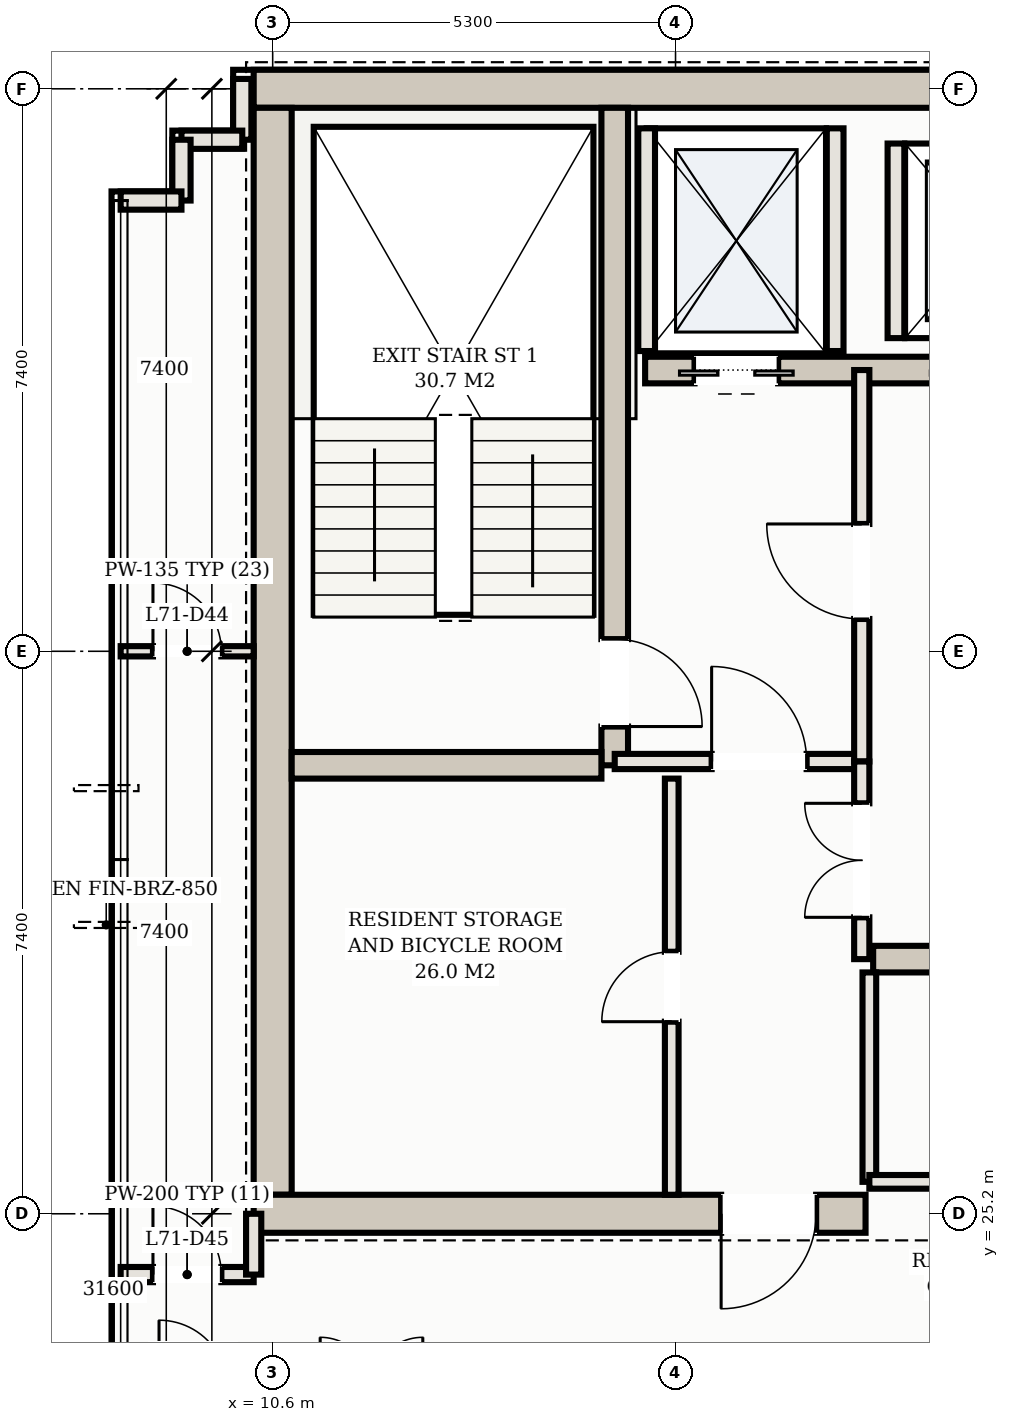
"""IFC4 building model, lengths in metres.
Left out: names, types, materials, properties, quantities, classifications, styles, units other than length and angle.
Written with IfcOpenShell. Run it as: python <this file> out.ifc"""

import sys

from ifc_helpers import new_model, si_unit, direction, frame, frame_2d, origin, place, context, subcontext, project, spatial, rectangle, extrude, element, fill, save


model = new_model("IFC4")
c1 = context("Model", 3, precision=1e-05, world=origin(), true_north=direction((0.0, 1.0)))
c2 = subcontext(c1, "Body", "Model", "MODEL_VIEW")
j1 = project(units=[si_unit("LENGTHUNIT", "METRE"), si_unit("PLANEANGLEUNIT", "RADIAN")], contexts=[c1])
p1 = place(None, origin())
s1 = spatial("IfcSite", under=j1, at=p1, CompositionType="ELEMENT")
p2 = place(p1, origin())
s2 = spatial("IfcBuilding", under=s1, at=p2, CompositionType="ELEMENT")
p3 = place(p2, frame((0.0, 0.0, 256.1)))
s3 = spatial("IfcBuildingStorey", under=s2, at=p3, CompositionType="ELEMENT", Elevation=256.1)
p4 = place(p3, frame((10.35, 40.0, 0.0), z_axis=(0.0, 0.0, 1.0), x_axis=(1.0, 0.0, 0.0)))
e1 = element("IfcWall", 1, at=p4, inside=s3, PredefinedType="SHEAR", context=c2, shape_type="SweptSolid", body=[
    extrude(rectangle(XDim=32.3, YDim=0.5, at=frame_2d((16.15, 0.0))), origin(), (0.0, 0.0, 1.0), 3.11),
])
p5 = place(p3, frame((10.6, 25.45, 0.0), z_axis=(0.0, 0.0, 1.0), x_axis=(0.0, 1.0, 0.0)))
e2 = element("IfcWall", 2, at=p5, inside=s3, PredefinedType="SHEAR", context=c2, shape_type="SweptSolid", body=[
    extrude(rectangle(XDim=14.3, YDim=0.5, at=frame_2d((7.15, 0.0))), origin(), (0.0, 0.0, 1.0), 3.11),
])
p6 = place(p3, frame((10.35, 25.2, 0.0), z_axis=(0.0, 0.0, 1.0), x_axis=(1.0, 0.0, 0.0)))
e3 = element("IfcWall", 3, at=p6, inside=s3, PredefinedType="SHEAR", context=c2, shape_type="SweptSolid", body=[
    extrude(rectangle(XDim=8.05, YDim=0.5, at=frame_2d((4.025, 0.0))), origin(), (0.0, 0.0, 1.0), 3.11),
])
p7 = place(p6, frame((6.15, 0.0, 0.0)))
e4 = element("IfcOpeningElement", 4, at=p7, cuts=e3, PredefinedType="OPENING", context=c2, shape_type="SweptSolid", body=[
    extrude(rectangle(XDim=1.25, YDim=2.2, at=frame_2d((0.625, 1.1))), frame((0.0, 0.26, 0.0), z_axis=(0.0, -1.0, 0.0), x_axis=(1.0, 0.0, 0.0)), (0.0, 0.0, 1.0), 0.52),
])
p8 = place(p3, frame((15.1, 31.1, 0.0), z_axis=(0.0, 0.0, 1.0), x_axis=(0.0, 1.0, 0.0)))
e5 = element("IfcWall", 5, at=p8, inside=s3, PredefinedType="SHEAR", context=c2, shape_type="SweptSolid", body=[
    extrude(rectangle(XDim=8.65, YDim=0.35, at=frame_2d((4.325, 0.0))), origin(), (0.0, 0.0, 1.0), 3.11),
])
p9 = place(p8, frame((0.51, 0.0, 0.0)))
e6 = element("IfcOpeningElement", 6, at=p9, cuts=e5, PredefinedType="OPENING", context=c2, shape_type="SweptSolid", body=[
    extrude(rectangle(XDim=1.15, YDim=2.2, at=frame_2d((0.575, 1.1))), frame((0.0, 0.185, 0.0), z_axis=(0.0, -1.0, 0.0), x_axis=(1.0, 0.0, 0.0)), (0.0, 0.0, 1.0), 0.37),
])
p10 = place(p3, frame((10.85, 31.1, 0.0), z_axis=(0.0, 0.0, 1.0), x_axis=(1.0, 0.0, 0.0)))
e7 = element("IfcWall", 7, at=p10, inside=s3, PredefinedType="SHEAR", context=c2, shape_type="SweptSolid", body=[
    extrude(rectangle(XDim=4.075, YDim=0.35, at=frame_2d((2.038, 0.0))), origin(), (0.0, 0.0, 1.0), 3.11),
])
p11 = place(p3, frame((15.5, 36.3, 0.0), z_axis=(0.0, 0.0, 1.0), x_axis=(1.0, 0.0, 0.0)))
e8 = element("IfcWall", 8, at=p11, inside=s3, PredefinedType="SHEAR", context=c2, shape_type="SweptSolid", body=[
    extrude(rectangle(XDim=22.0, YDim=0.35, at=frame_2d((11.0, 0.0))), origin(), (0.0, 0.0, 1.0), 3.11),
])
p12 = place(p11, frame((0.65, 0.0, 0.0)))
e9 = element("IfcOpeningElement", 9, at=p12, cuts=e8, PredefinedType="OPENING", context=c2, shape_type="SweptSolid", body=[
    extrude(rectangle(XDim=1.1, YDim=2.15, at=frame_2d((0.55, 1.075))), frame((0.0, 0.185, 0.0), z_axis=(0.0, -1.0, 0.0), x_axis=(1.0, 0.0, 0.0)), (0.0, 0.0, 1.0), 0.37),
])
p13 = place(p11, frame((20.25, 0.0, 0.0)))
e10 = element("IfcOpeningElement", 10, at=p13, cuts=e8, PredefinedType="OPENING", context=c2, shape_type="SweptSolid", body=[
    extrude(rectangle(XDim=1.1, YDim=2.15, at=frame_2d((0.55, 1.075))), frame((0.0, 0.185, 0.0), z_axis=(0.0, -1.0, 0.0), x_axis=(1.0, 0.0, 0.0)), (0.0, 0.0, 1.0), 0.37),
])
p14 = place(p11, frame((17.05, 0.0, 0.0)))
e11 = element("IfcOpeningElement", 11, at=p14, cuts=e8, PredefinedType="OPENING", context=c2, shape_type="SweptSolid", body=[
    extrude(rectangle(XDim=1.3, YDim=2.2, at=frame_2d((0.65, 1.1))), frame((0.0, 0.185, 0.0), z_axis=(0.0, -1.0, 0.0), x_axis=(1.0, 0.0, 0.0)), (0.0, 0.0, 1.0), 0.37),
])
p15 = place(p11, frame((3.95, 0.0, 0.0)))
e12 = element("IfcOpeningElement", 12, at=p15, cuts=e8, PredefinedType="OPENING", context=c2, shape_type="SweptSolid", body=[
    extrude(rectangle(XDim=1.1, YDim=2.15, at=frame_2d((0.55, 1.075))), frame((0.0, 0.185, 0.0), z_axis=(0.0, -1.0, 0.0), x_axis=(1.0, 0.0, 0.0)), (0.0, 0.0, 1.0), 0.37),
])
p16 = place(p11, frame((6.55, 0.0, 0.0)))
e13 = element("IfcOpeningElement", 13, at=p16, cuts=e8, PredefinedType="OPENING", context=c2, shape_type="SweptSolid", body=[
    extrude(rectangle(XDim=1.1, YDim=2.15, at=frame_2d((0.55, 1.075))), frame((0.0, 0.185, 0.0), z_axis=(0.0, -1.0, 0.0), x_axis=(1.0, 0.0, 0.0)), (0.0, 0.0, 1.0), 0.37),
])
p17 = place(p11, frame((9.15, 0.0, 0.0)))
e14 = element("IfcOpeningElement", 14, at=p17, cuts=e8, PredefinedType="OPENING", context=c2, shape_type="SweptSolid", body=[
    extrude(rectangle(XDim=1.1, YDim=2.15, at=frame_2d((0.55, 1.075))), frame((0.0, 0.185, 0.0), z_axis=(0.0, -1.0, 0.0), x_axis=(1.0, 0.0, 0.0)), (0.0, 0.0, 1.0), 0.37),
])
p18 = place(p3, frame((18.5, 28.55, 0.0), z_axis=(0.0, 0.0, 1.0), x_axis=(1.0, 0.0, 0.0)))
e15 = element("IfcWall", 15, at=p18, inside=s3, PredefinedType="SHEAR", context=c2, shape_type="SweptSolid", body=[
    extrude(rectangle(XDim=16.0, YDim=0.35, at=frame_2d((8.0, 0.0))), origin(), (0.0, 0.0, 1.0), 3.11),
])
for number, where, z_axis, x_axis in (
    (16, (15.52, 36.55, 0.0), (0.0, 0.0, 1.0), (0.0, 1.0, 0.0)),
    (17, (18.0, 36.55, 0.0), (0.0, 0.0, 1.0), (0.0, 1.0, 0.0)),
):
    element("IfcWall", number, at=place(p3, frame(where, z_axis=z_axis, x_axis=x_axis)), inside=s3, PredefinedType="SOLIDWALL", context=c2, shape_type="SweptSolid", body=[
        extrude(rectangle(XDim=2.93, YDim=0.22, at=frame_2d((1.465, 0.0))), origin(), (0.0, 0.0, 1.0), 3.11),
    ])
p19 = place(p3, frame((18.8, 36.72, 0.0), z_axis=(0.0, 0.0, 1.0), x_axis=(0.0, 1.0, 0.0)))
e18 = element("IfcWall", 18, at=p19, inside=s3, PredefinedType="SOLIDWALL", context=c2, shape_type="SweptSolid", body=[
    extrude(rectangle(XDim=2.56, YDim=0.22, at=frame_2d((1.28, 0.0))), origin(), (0.0, 0.0, 1.0), 3.11),
])
p20 = place(p3, frame((10.2, 40.13, 0.0), z_axis=(0.0, 0.0, 1.0), x_axis=(0.0, -1.0, 0.0)))
e19 = element("IfcWall", 19, at=p20, inside=s3, PredefinedType="SOLIDWALL", context=c2, shape_type="SweptSolid", body=[
    extrude(rectangle(XDim=0.8, YDim=0.24, at=frame_2d((0.4, 0.0))), origin(), (0.0, 0.0, 1.0), 3.11),
])
for number, where, z_axis, x_axis in (
    (20, (10.2, 39.33, 0.0), (0.0, 0.0, 1.0), (-1.0, 0.0, 0.0)),
    (21, (9.4, 39.33, 0.0), (0.0, 0.0, 1.0), (0.0, -1.0, 0.0)),
):
    element("IfcWall", number, at=place(p3, frame(where, z_axis=z_axis, x_axis=x_axis)), inside=s3, PredefinedType="SOLIDWALL", context=c2, shape_type="SweptSolid", body=[
        extrude(rectangle(XDim=0.8, YDim=0.24, at=frame_2d((0.4, 0.0))), origin(), (0.0, 0.0, 1.0), 3.11),
    ])
p21 = place(p3, frame((9.4, 38.53, 0.0), z_axis=(0.0, 0.0, 1.0), x_axis=(-1.0, 0.0, 0.0)))
e22 = element("IfcWall", 22, at=p21, inside=s3, PredefinedType="SOLIDWALL", context=c2, shape_type="SweptSolid", body=[
    extrude(rectangle(XDim=0.8, YDim=0.24, at=frame_2d((0.4, 0.0))), origin(), (0.0, 0.0, 1.0), 3.11),
])
p22 = place(p3, frame((15.1, 31.15, 0.0), z_axis=(0.0, 0.0, 1.0), x_axis=(1.0, 0.0, 0.0)))
e23 = element("IfcWall", 23, at=p22, inside=s3, PredefinedType="PARTITIONING", context=c2, shape_type="SweptSolid", body=[
    extrude(rectangle(XDim=3.25, YDim=0.2, at=frame_2d((1.625, 0.0))), origin(), (0.0, 0.0, 1.0), 2.45),
])
p23 = place(p22, frame((1.275, 0.0, 0.0)))
e24 = element("IfcOpeningElement", 24, at=p23, cuts=e23, PredefinedType="OPENING", context=c2, shape_type="SweptSolid", body=[
    extrude(rectangle(XDim=1.25, YDim=2.2, at=frame_2d((0.625, 1.1))), frame((0.0, 0.11, 0.0), z_axis=(0.0, -1.0, 0.0), x_axis=(1.0, 0.0, 0.0)), (0.0, 0.0, 1.0), 0.22),
])
p24 = place(p3, frame((18.35, 31.15, 0.0), z_axis=(0.0, 0.0, 1.0), x_axis=(0.0, 1.0, 0.0)))
e25 = element("IfcWall", 25, at=p24, inside=s3, PredefinedType="PARTITIONING", context=c2, shape_type="SweptSolid", body=[
    extrude(rectangle(XDim=5.15, YDim=0.2, at=frame_2d((2.575, 0.0))), origin(), (0.0, 0.0, 1.0), 2.45),
])
p25 = place(p24, frame((1.875, 0.0, 0.0)))
e26 = element("IfcOpeningElement", 26, at=p25, cuts=e25, PredefinedType="OPENING", context=c2, shape_type="SweptSolid", body=[
    extrude(rectangle(XDim=1.25, YDim=2.2, at=frame_2d((0.625, 1.1))), frame((0.0, 0.11, 0.0), z_axis=(0.0, -1.0, 0.0), x_axis=(1.0, 0.0, 0.0)), (0.0, 0.0, 1.0), 0.22),
])
p26 = place(p3, frame((15.85, 25.45, 0.0), z_axis=(0.0, 0.0, 1.0), x_axis=(0.0, 1.0, 0.0)))
e27 = element("IfcWall", 27, at=p26, inside=s3, PredefinedType="PARTITIONING", context=c2, shape_type="SweptSolid", body=[
    extrude(rectangle(XDim=5.475, YDim=0.18, at=frame_2d((2.738, 0.0))), origin(), (0.0, 0.0, 1.0), 2.45),
])
p27 = place(p26, frame((2.277, 0.0, 0.0)))
e28 = element("IfcOpeningElement", 28, at=p27, cuts=e27, PredefinedType="OPENING", context=c2, shape_type="SweptSolid", body=[
    extrude(rectangle(XDim=0.92, YDim=2.15, at=frame_2d((0.46, 1.075))), frame((0.0, 0.1, 0.0), z_axis=(0.0, -1.0, 0.0), x_axis=(1.0, 0.0, 0.0)), (0.0, 0.0, 1.0), 0.2),
])
p28 = place(p3, frame((18.35, 28.55, 0.0), z_axis=(0.0, 0.0, 1.0), x_axis=(0.0, 1.0, 0.0)))
e29 = element("IfcWall", 29, at=p28, inside=s3, PredefinedType="PARTITIONING", context=c2, shape_type="SweptSolid", body=[
    extrude(rectangle(XDim=2.6, YDim=0.2, at=frame_2d((1.3, 0.0))), origin(), (0.0, 0.0, 1.0), 2.45),
])
p29 = place(p28, frame((0.55, 0.0, 0.0)))
e30 = element("IfcOpeningElement", 30, at=p29, cuts=e29, PredefinedType="OPENING", context=c2, shape_type="SweptSolid", body=[
    extrude(rectangle(XDim=1.5, YDim=2.25, at=frame_2d((0.75, 1.125))), frame((0.0, 0.11, 0.0), z_axis=(0.0, -1.0, 0.0), x_axis=(1.0, 0.0, 0.0)), (0.0, 0.0, 1.0), 0.22),
])
p30 = place(p3, frame((18.45, 25.62, 0.0), z_axis=(0.0, 0.0, 1.0), x_axis=(0.0, 1.0, 0.0)))
e31 = element("IfcWall", 31, at=p30, inside=s3, PredefinedType="PARTITIONING", context=c2, shape_type="SweptSolid", body=[
    extrude(rectangle(XDim=2.755, YDim=0.18, at=frame_2d((1.377, 0.0))), origin(), (0.0, 0.0, 1.0), 2.45),
])
p31 = place(p3, frame((18.45, 25.62, 0.0), z_axis=(0.0, 0.0, 1.0), x_axis=(1.0, 0.0, 0.0)))
e32 = element("IfcWall", 32, at=p31, inside=s3, PredefinedType="PARTITIONING", context=c2, shape_type="SweptSolid", body=[
    extrude(rectangle(XDim=7.9, YDim=0.18, at=frame_2d((3.95, 0.0))), origin(), (0.0, 0.0, 1.0), 2.45),
])
p32 = place(p31, frame((3.34, 0.0, 0.0)))
e33 = element("IfcOpeningElement", 33, at=p32, cuts=e32, PredefinedType="OPENING", context=c2, shape_type="SweptSolid", body=[
    extrude(rectangle(XDim=0.92, YDim=2.15, at=frame_2d((0.46, 1.075))), frame((0.0, 0.1, 0.0), z_axis=(0.0, -1.0, 0.0), x_axis=(1.0, 0.0, 0.0)), (0.0, 0.0, 1.0), 0.2),
])
p33 = place(p3, frame((8.6, 24.4, 0.0), z_axis=(0.0, 0.0, 1.0), x_axis=(1.0, 0.0, 0.0)))
e34 = element("IfcWall", 34, at=p33, inside=s3, PredefinedType="PARTITIONING", context=c2, shape_type="SweptSolid", body=[
    extrude(rectangle(XDim=1.75, YDim=0.2, at=frame_2d((0.875, 0.0))), origin(), (0.0, 0.0, 1.0), 2.45),
])
p34 = place(p33, frame((0.425, 0.0, 0.0)))
e35 = element("IfcOpeningElement", 35, at=p34, cuts=e34, PredefinedType="OPENING", context=c2, shape_type="SweptSolid", body=[
    extrude(rectangle(XDim=0.9, YDim=2.15, at=frame_2d((0.45, 1.075))), frame((0.0, 0.11, 0.0), z_axis=(0.0, -1.0, 0.0), x_axis=(1.0, 0.0, 0.0)), (0.0, 0.0, 1.0), 0.22),
])
p35 = place(p3, frame((10.35, 24.4, 0.0), z_axis=(0.0, 0.0, 1.0), x_axis=(0.0, 1.0, 0.0)))
e36 = element("IfcWall", 36, at=p35, inside=s3, PredefinedType="PARTITIONING", context=c2, shape_type="SweptSolid", body=[
    extrude(rectangle(XDim=0.8, YDim=0.2, at=frame_2d((0.4, 0.0))), origin(), (0.0, 0.0, 1.0), 2.45),
])
p36 = place(p3, frame((8.6, 32.6, 0.0), z_axis=(0.0, 0.0, 1.0), x_axis=(1.0, 0.0, 0.0)))
e37 = element("IfcWall", 37, at=p36, inside=s3, PredefinedType="PARTITIONING", context=c2, shape_type="SweptSolid", body=[
    extrude(rectangle(XDim=1.75, YDim=0.135, at=frame_2d((0.875, 0.0))), origin(), (0.0, 0.0, 1.0), 2.45),
])
p37 = place(p36, frame((0.425, 0.0, 0.0)))
e38 = element("IfcOpeningElement", 38, at=p37, cuts=e37, PredefinedType="OPENING", context=c2, shape_type="SweptSolid", body=[
    extrude(rectangle(XDim=0.9, YDim=2.15, at=frame_2d((0.45, 1.075))), frame((0.0, 0.078, 0.0), z_axis=(0.0, -1.0, 0.0), x_axis=(1.0, 0.0, 0.0)), (0.0, 0.0, 1.0), 0.155),
])
p38 = place(p12, frame((1.1, 0.0, 0.0), z_axis=(0.0, 0.0, 1.0), x_axis=(-1.0, 0.0, 0.0)))
e39 = element("IfcDoor", 39, at=p38, inside=s3, OperationType="DOUBLE_DOOR_SLIDING", PredefinedType="DOOR", context=c2, shape_type="SweptSolid", body=[
    extrude(rectangle(XDim=1.1, YDim=2.15, at=frame_2d((0.55, 1.075))), frame((0.0, 0.025, 0.0), z_axis=(0.0, -1.0, 0.0), x_axis=(1.0, 0.0, 0.0)), (0.0, 0.0, 1.0), 0.05),
])
fill(e9, e39)
p39 = place(p7, frame((1.25, 0.0, 0.0), z_axis=(0.0, 0.0, 1.0), x_axis=(-1.0, 0.0, 0.0)))
e40 = element("IfcDoor", 40, at=p39, inside=s3, OperationType="SINGLE_SWING_RIGHT", PredefinedType="DOOR", context=c2, shape_type="SweptSolid", body=[
    extrude(rectangle(XDim=1.25, YDim=2.2, at=frame_2d((0.625, 1.1))), frame((0.0, 0.025, 0.0), z_axis=(0.0, -1.0, 0.0), x_axis=(1.0, 0.0, 0.0)), (0.0, 0.0, 1.0), 0.05),
])
fill(e4, e40)
p40 = place(p23, origin())
e41 = element("IfcDoor", 41, at=p40, inside=s3, OperationType="SINGLE_SWING_LEFT", PredefinedType="DOOR", context=c2, shape_type="SweptSolid", body=[
    extrude(rectangle(XDim=1.25, YDim=2.2, at=frame_2d((0.625, 1.1))), frame((0.0, 0.025, 0.0), z_axis=(0.0, -1.0, 0.0), x_axis=(1.0, 0.0, 0.0)), (0.0, 0.0, 1.0), 0.05),
])
fill(e24, e41)
p41 = place(p25, origin())
e42 = element("IfcDoor", 42, at=p41, inside=s3, OperationType="SINGLE_SWING_RIGHT", PredefinedType="DOOR", context=c2, shape_type="SweptSolid", body=[
    extrude(rectangle(XDim=1.25, YDim=2.2, at=frame_2d((0.625, 1.1))), frame((0.0, 0.025, 0.0), z_axis=(0.0, -1.0, 0.0), x_axis=(1.0, 0.0, 0.0)), (0.0, 0.0, 1.0), 0.05),
])
fill(e26, e42)
p42 = place(p9, frame((1.15, 0.0, 0.0), z_axis=(0.0, 0.0, 1.0), x_axis=(-1.0, 0.0, 0.0)))
e43 = element("IfcDoor", 43, at=p42, inside=s3, OperationType="SINGLE_SWING_RIGHT", PredefinedType="DOOR", context=c2, shape_type="SweptSolid", body=[
    extrude(rectangle(XDim=1.15, YDim=2.2, at=frame_2d((0.575, 1.1))), frame((0.0, 0.025, 0.0), z_axis=(0.0, -1.0, 0.0), x_axis=(1.0, 0.0, 0.0)), (0.0, 0.0, 1.0), 0.05),
])
fill(e6, e43)
p43 = place(p27, origin())
e44 = element("IfcDoor", 44, at=p43, inside=s3, OperationType="SINGLE_SWING_LEFT", PredefinedType="DOOR", context=c2, shape_type="SweptSolid", body=[
    extrude(rectangle(XDim=0.92, YDim=2.15, at=frame_2d((0.46, 1.075))), frame((0.0, 0.025, 0.0), z_axis=(0.0, -1.0, 0.0), x_axis=(1.0, 0.0, 0.0)), (0.0, 0.0, 1.0), 0.05),
])
fill(e28, e44)
p44 = place(p29, origin())
e45 = element("IfcDoor", 45, at=p44, inside=s3, OperationType="DOUBLE_DOOR_SINGLE_SWING", PredefinedType="DOOR", context=c2, shape_type="SweptSolid", body=[
    extrude(rectangle(XDim=1.5, YDim=2.25, at=frame_2d((0.75, 1.125))), frame((0.0, 0.025, 0.0), z_axis=(0.0, -1.0, 0.0), x_axis=(1.0, 0.0, 0.0)), (0.0, 0.0, 1.0), 0.05),
])
fill(e30, e45)
p45 = place(p37, origin())
e46 = element("IfcDoor", 46, at=p45, inside=s3, OperationType="SINGLE_SWING_LEFT", PredefinedType="DOOR", context=c2, shape_type="SweptSolid", body=[
    extrude(rectangle(XDim=0.9, YDim=2.15, at=frame_2d((0.45, 1.075))), frame((0.0, 0.025, 0.0), z_axis=(0.0, -1.0, 0.0), x_axis=(1.0, 0.0, 0.0)), (0.0, 0.0, 1.0), 0.05),
])
fill(e38, e46)
p46 = place(p34, origin())
e47 = element("IfcDoor", 47, at=p46, inside=s3, OperationType="SINGLE_SWING_LEFT", PredefinedType="DOOR", context=c2, shape_type="SweptSolid", body=[
    extrude(rectangle(XDim=0.9, YDim=2.15, at=frame_2d((0.45, 1.075))), frame((0.0, 0.025, 0.0), z_axis=(0.0, -1.0, 0.0), x_axis=(1.0, 0.0, 0.0)), (0.0, 0.0, 1.0), 0.05),
])
fill(e35, e47)
save(model, sys.argv[1])
